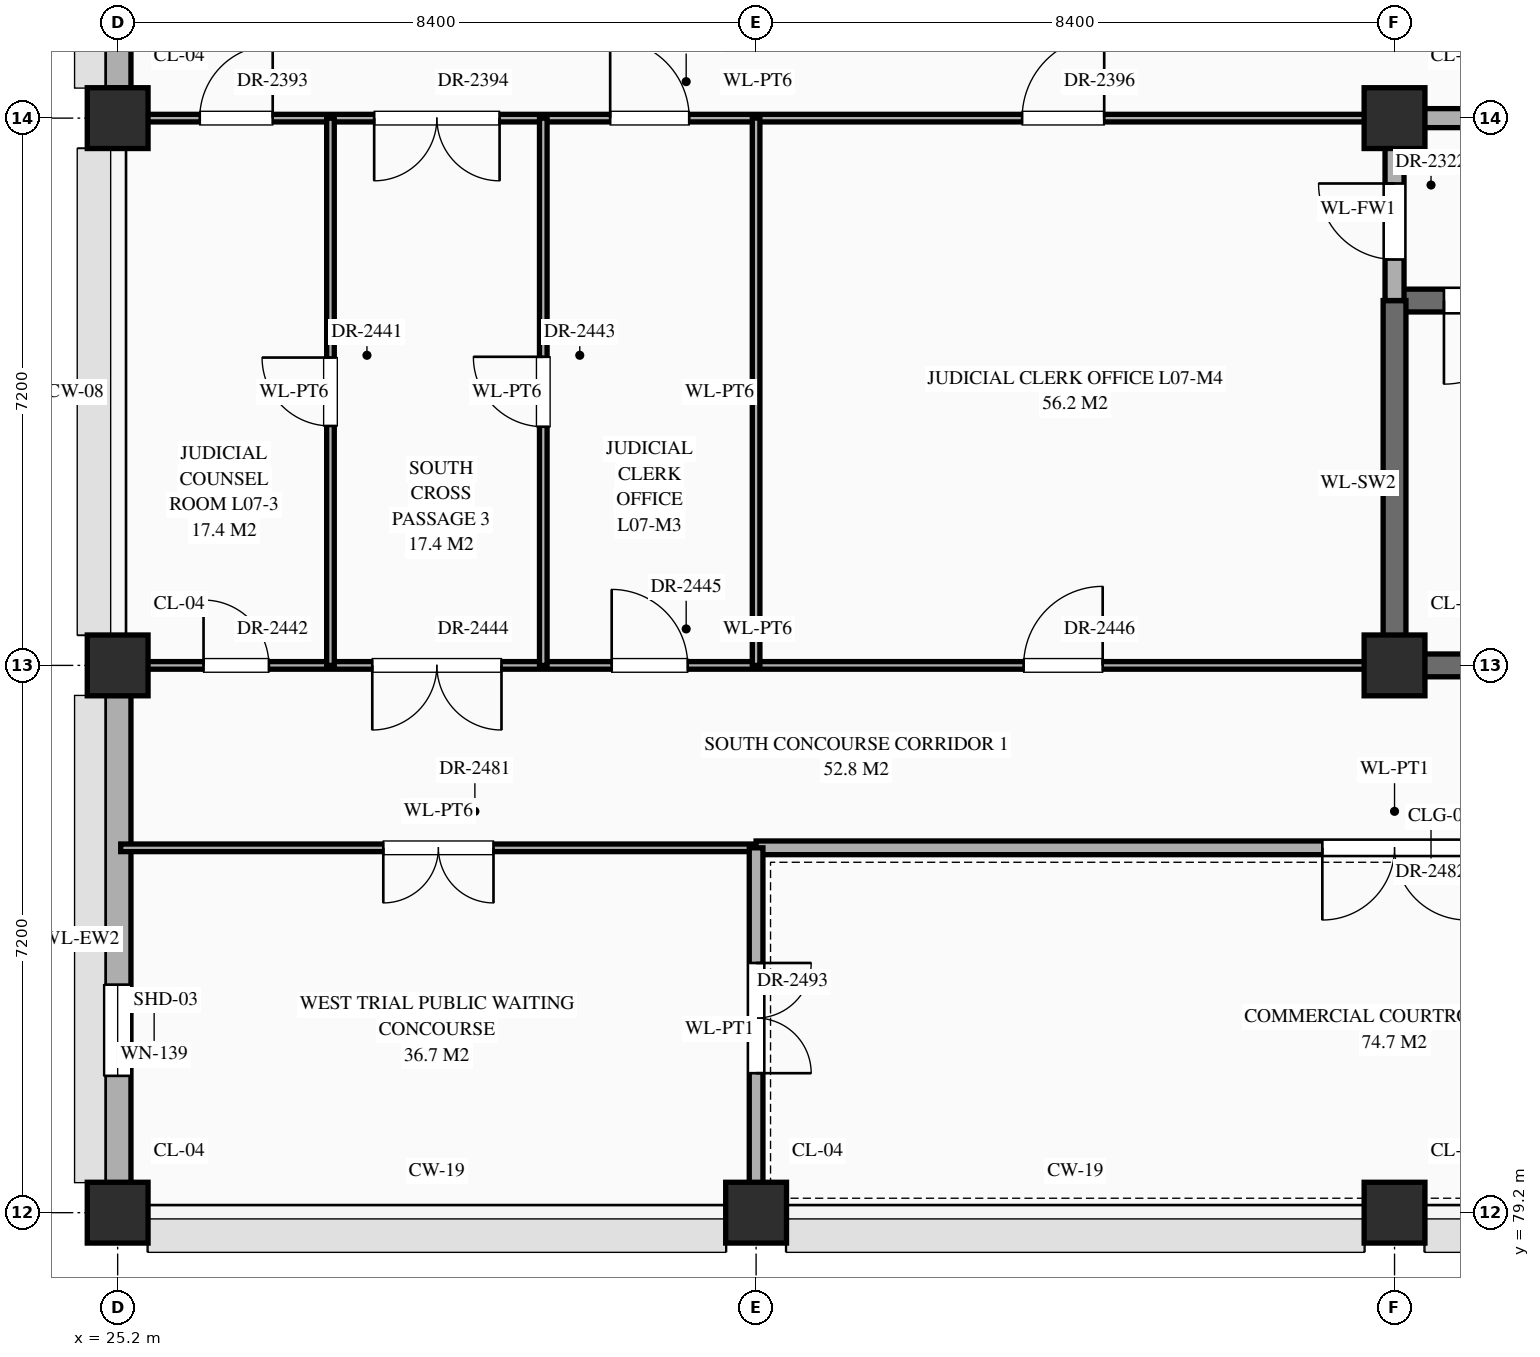
"""IFC4 building model, lengths in metres.
Left out: names, types, materials, properties, quantities, classifications, styles, units other than length and angle.
Written with IfcOpenShell. Run it as: python <this file> out.ifc"""

import sys

from ifc_helpers import new_model, si_unit, direction, frame, frame_2d, origin, origin_2d, place, context, subcontext, project, spatial, rectangle, extrude, element, fill, save


model = new_model("IFC4")
c1 = context("Model", 3, precision=1e-05, world=origin(), true_north=direction((0.0, 1.0)))
c2 = subcontext(c1, "Body", "Model", "MODEL_VIEW")
j1 = project(units=[si_unit("LENGTHUNIT", "METRE"), si_unit("PLANEANGLEUNIT", "RADIAN")], contexts=[c1])
p1 = place(None, origin())
s1 = spatial("IfcSite", under=j1, at=p1, CompositionType="ELEMENT")
p2 = place(p1, origin())
s2 = spatial("IfcBuilding", under=s1, at=p2, CompositionType="ELEMENT")
p3 = place(p2, frame((0.0, 0.0, 30.6)))
s3 = spatial("IfcBuildingStorey", under=s2, at=p3, CompositionType="ELEMENT", Elevation=30.6)
for number, where, z_axis, x_axis in (
    (1, (25.2, 79.2, 0.0), (0.0, 0.0, 1.0), (1.0, 0.0, 0.0)),
    (2, (25.2, 86.4, 0.0), (0.0, 0.0, 1.0), (1.0, 0.0, 0.0)),
    (3, (25.2, 93.6, 0.0), (0.0, 0.0, 1.0), (1.0, 0.0, 0.0)),
    (4, (33.6, 79.2, 0.0), (0.0, 0.0, 1.0), (1.0, 0.0, 0.0)),
    (5, (42.0, 79.2, 0.0), (0.0, 0.0, 1.0), (1.0, 0.0, 0.0)),
    (6, (42.0, 86.4, 0.0), (0.0, 0.0, 1.0), (1.0, 0.0, 0.0)),
    (7, (42.0, 93.6, 0.0), (0.0, 0.0, 1.0), (1.0, 0.0, 0.0)),
):
    element("IfcColumn", number, at=place(p3, frame(where, z_axis=z_axis, x_axis=x_axis)), inside=s3, PredefinedType="COLUMN", context=c2, shape_type="SweptSolid", body=[
        extrude(rectangle(XDim=0.8, YDim=0.8, at=origin_2d()), origin(), (0.0, 0.0, 1.0), 4.5),
    ])
p4 = place(p3, frame((25.2, 79.595, 0.0), z_axis=(0.0, 0.0, 1.0), x_axis=(0.0, 1.0, 0.0)))
e8 = element("IfcWall", 8, at=p4, inside=s3, PredefinedType="STANDARD", context=c2, shape_type="SweptSolid", body=[
    extrude(rectangle(XDim=6.41, YDim=0.35, at=frame_2d((3.205, 0.0))), origin(), (0.0, 0.0, 1.0), 3.65),
])
p5 = place(p4, frame((1.405, 0.0, 0.85)))
e9 = element("IfcOpeningElement", 9, at=p5, cuts=e8, PredefinedType="OPENING", context=c2, shape_type="SweptSolid", body=[
    extrude(rectangle(XDim=1.2, YDim=2.12, at=frame_2d((0.6, 1.06))), frame((0.0, 0.187, 0.0), z_axis=(0.0, -1.0, 0.0), x_axis=(1.0, 0.0, 0.0)), (0.0, 0.0, 1.0), 0.374),
])
p6 = place(p3, frame((25.2, 93.995, 0.0), z_axis=(0.0, 0.0, 1.0), x_axis=(0.0, 1.0, 0.0)))
e10 = element("IfcWall", 10, at=p6, inside=s3, PredefinedType="STANDARD", context=c2, shape_type="SweptSolid", body=[
    extrude(rectangle(XDim=6.41, YDim=0.35, at=frame_2d((3.205, 0.0))), origin(), (0.0, 0.0, 1.0), 3.65),
])
p7 = place(p6, frame((3.73, 0.0, 0.85)))
e11 = element("IfcOpeningElement", 11, at=p7, cuts=e10, PredefinedType="OPENING", context=c2, shape_type="SweptSolid", body=[
    extrude(rectangle(XDim=1.55, YDim=1.38, at=frame_2d((0.775, 0.69))), frame((0.0, 0.187, 0.0), z_axis=(0.0, -1.0, 0.0), x_axis=(1.0, 0.0, 0.0)), (0.0, 0.0, 1.0), 0.374),
])
p8 = place(p3, frame((25.24, 84.0, 0.0), z_axis=(0.0, 0.0, 1.0), x_axis=(1.0, 0.0, 0.0)))
e12 = element("IfcWall", 12, at=p8, inside=s3, PredefinedType="STANDARD", context=c2, shape_type="SweptSolid", body=[
    extrude(rectangle(XDim=8.36, YDim=0.1, at=frame_2d((4.18, 0.0))), origin(), (0.0, 0.0, 1.0), 4.3),
])
p9 = place(p8, frame((3.455, 0.0, 0.0)))
e13 = element("IfcOpeningElement", 13, at=p9, cuts=e12, PredefinedType="OPENING", context=c2, shape_type="SweptSolid", body=[
    extrude(rectangle(XDim=1.45, YDim=2.3, at=frame_2d((0.725, 1.15))), frame((0.0, 0.062, 0.0), z_axis=(0.0, -1.0, 0.0), x_axis=(1.0, 0.0, 0.0)), (0.0, 0.0, 1.0), 0.124),
])
p10 = place(p3, frame((33.6, 84.0, 0.0), z_axis=(0.0, 0.0, 1.0), x_axis=(1.0, 0.0, 0.0)))
e14 = element("IfcWall", 14, at=p10, inside=s3, PredefinedType="STANDARD", context=c2, shape_type="SweptSolid", body=[
    extrude(rectangle(XDim=16.8, YDim=0.18, at=frame_2d((8.4, 0.0))), origin(), (0.0, 0.0, 1.0), 4.15),
])
p11 = place(p10, frame((7.45, 0.0, 0.0)))
e15 = element("IfcOpeningElement", 15, at=p11, cuts=e14, PredefinedType="OPENING", context=c2, shape_type="SweptSolid", body=[
    extrude(rectangle(XDim=1.9, YDim=2.5, at=frame_2d((0.95, 1.25))), frame((0.0, 0.102, 0.0), z_axis=(0.0, -1.0, 0.0), x_axis=(1.0, 0.0, 0.0)), (0.0, 0.0, 1.0), 0.204),
])
p12 = place(p3, frame((25.24, 86.4, 0.0), z_axis=(0.0, 0.0, 1.0), x_axis=(1.0, 0.0, 0.0)))
e16 = element("IfcWall", 16, at=p12, inside=s3, PredefinedType="STANDARD", context=c2, shape_type="SweptSolid", body=[
    extrude(rectangle(XDim=16.76, YDim=0.1, at=frame_2d((8.38, 0.0))), origin(), (0.0, 0.0, 1.0), 3.1),
])
p13 = place(p12, frame((1.09, 0.0, 0.0)))
e17 = element("IfcOpeningElement", 17, at=p13, cuts=e16, PredefinedType="OPENING", context=c2, shape_type="SweptSolid", body=[
    extrude(rectangle(XDim=0.86, YDim=2.1, at=frame_2d((0.43, 1.05))), frame((0.0, 0.062, 0.0), z_axis=(0.0, -1.0, 0.0), x_axis=(1.0, 0.0, 0.0)), (0.0, 0.0, 1.0), 0.124),
])
p14 = place(p12, frame((3.31, 0.0, 0.0)))
e18 = element("IfcOpeningElement", 18, at=p14, cuts=e16, PredefinedType="OPENING", context=c2, shape_type="SweptSolid", body=[
    extrude(rectangle(XDim=1.7, YDim=2.45, at=frame_2d((0.85, 1.225))), frame((0.0, 0.062, 0.0), z_axis=(0.0, -1.0, 0.0), x_axis=(1.0, 0.0, 0.0)), (0.0, 0.0, 1.0), 0.124),
])
p15 = place(p12, frame((6.46, 0.0, 0.0)))
e19 = element("IfcOpeningElement", 19, at=p15, cuts=e16, PredefinedType="OPENING", context=c2, shape_type="SweptSolid", body=[
    extrude(rectangle(XDim=1.0, YDim=2.25, at=frame_2d((0.5, 1.125))), frame((0.0, 0.062, 0.0), z_axis=(0.0, -1.0, 0.0), x_axis=(1.0, 0.0, 0.0)), (0.0, 0.0, 1.0), 0.124),
])
p16 = place(p12, frame((11.88, 0.0, 0.0)))
e20 = element("IfcOpeningElement", 20, at=p16, cuts=e16, PredefinedType="OPENING", context=c2, shape_type="SweptSolid", body=[
    extrude(rectangle(XDim=1.04, YDim=2.2, at=frame_2d((0.52, 1.1))), frame((0.0, 0.062, 0.0), z_axis=(0.0, -1.0, 0.0), x_axis=(1.0, 0.0, 0.0)), (0.0, 0.0, 1.0), 0.124),
])
p17 = place(p3, frame((42.0, 86.4, 0.0), z_axis=(0.0, 0.0, 1.0), x_axis=(1.0, 0.0, 0.0)))
e21 = element("IfcWall", 21, at=p17, inside=s3, PredefinedType="SHEAR", context=c2, shape_type="SweptSolid", body=[
    extrude(rectangle(XDim=8.4, YDim=0.3, at=frame_2d((4.2, 0.0))), origin(), (0.0, 0.0, 1.0), 4.24),
])
p18 = place(p3, frame((42.0, 91.2, 0.0), z_axis=(0.0, 0.0, 1.0), x_axis=(1.0, 0.0, 0.0)))
e22 = element("IfcWall", 22, at=p18, inside=s3, PredefinedType="SHEAR", context=c2, shape_type="SweptSolid", body=[
    extrude(rectangle(XDim=8.4, YDim=0.3, at=frame_2d((4.2, 0.0))), origin(), (0.0, 0.0, 1.0), 4.24),
])
p19 = place(p18, frame((0.65, 0.0, 0.0)))
e23 = element("IfcOpeningElement", 23, at=p19, cuts=e22, PredefinedType="OPENING", context=c2, shape_type="SweptSolid", body=[
    extrude(rectangle(XDim=1.1, YDim=2.2, at=frame_2d((0.55, 1.1))), frame((0.0, 0.162, 0.0), z_axis=(0.0, -1.0, 0.0), x_axis=(1.0, 0.0, 0.0)), (0.0, 0.0, 1.0), 0.324),
])
p20 = place(p3, frame((25.24, 93.6, 0.0), z_axis=(0.0, 0.0, 1.0), x_axis=(1.0, 0.0, 0.0)))
e24 = element("IfcWall", 24, at=p20, inside=s3, PredefinedType="STANDARD", context=c2, shape_type="SweptSolid", body=[
    extrude(rectangle(XDim=16.76, YDim=0.1, at=frame_2d((8.38, 0.0))), origin(), (0.0, 0.0, 1.0), 3.1),
])
p21 = place(p20, frame((1.04, 0.0, 0.0)))
e25 = element("IfcOpeningElement", 25, at=p21, cuts=e24, PredefinedType="OPENING", context=c2, shape_type="SweptSolid", body=[
    extrude(rectangle(XDim=0.96, YDim=2.2, at=frame_2d((0.48, 1.1))), frame((0.0, 0.062, 0.0), z_axis=(0.0, -1.0, 0.0), x_axis=(1.0, 0.0, 0.0)), (0.0, 0.0, 1.0), 0.124),
])
p22 = place(p20, frame((3.335, 0.0, 0.0)))
e26 = element("IfcOpeningElement", 26, at=p22, cuts=e24, PredefinedType="OPENING", context=c2, shape_type="SweptSolid", body=[
    extrude(rectangle(XDim=1.65, YDim=2.4, at=frame_2d((0.825, 1.2))), frame((0.0, 0.062, 0.0), z_axis=(0.0, -1.0, 0.0), x_axis=(1.0, 0.0, 0.0)), (0.0, 0.0, 1.0), 0.124),
])
p23 = place(p20, frame((6.44, 0.0, 0.0)))
e27 = element("IfcOpeningElement", 27, at=p23, cuts=e24, PredefinedType="OPENING", context=c2, shape_type="SweptSolid", body=[
    extrude(rectangle(XDim=1.04, YDim=2.2, at=frame_2d((0.52, 1.1))), frame((0.0, 0.062, 0.0), z_axis=(0.0, -1.0, 0.0), x_axis=(1.0, 0.0, 0.0)), (0.0, 0.0, 1.0), 0.124),
])
p24 = place(p20, frame((11.86, 0.0, 0.0)))
e28 = element("IfcOpeningElement", 28, at=p24, cuts=e24, PredefinedType="OPENING", context=c2, shape_type="SweptSolid", body=[
    extrude(rectangle(XDim=1.08, YDim=2.25, at=frame_2d((0.54, 1.125))), frame((0.0, 0.062, 0.0), z_axis=(0.0, -1.0, 0.0), x_axis=(1.0, 0.0, 0.0)), (0.0, 0.0, 1.0), 0.124),
])
p25 = place(p3, frame((42.0, 93.6, 0.0), z_axis=(0.0, 0.0, 1.0), x_axis=(1.0, 0.0, 0.0)))
e29 = element("IfcWall", 29, at=p25, inside=s3, PredefinedType="STANDARD", context=c2, shape_type="SweptSolid", body=[
    extrude(rectangle(XDim=8.4, YDim=0.25, at=frame_2d((4.2, 0.0))), origin(), (0.0, 0.0, 1.0), 3.39),
])
p26 = place(p25, frame((3.4, 0.0, 0.0)))
e30 = element("IfcOpeningElement", 30, at=p26, cuts=e29, PredefinedType="OPENING", context=c2, shape_type="SweptSolid", body=[
    extrude(rectangle(XDim=1.6, YDim=2.3, at=frame_2d((0.8, 1.15))), frame((0.0, 0.137, 0.0), z_axis=(0.0, -1.0, 0.0), x_axis=(1.0, 0.0, 0.0)), (0.0, 0.0, 1.0), 0.274),
])
p27 = place(p3, frame((28.0, 86.4, 0.0), z_axis=(0.0, 0.0, 1.0), x_axis=(0.0, 1.0, 0.0)))
e31 = element("IfcWall", 31, at=p27, inside=s3, PredefinedType="STANDARD", context=c2, shape_type="SweptSolid", body=[
    extrude(rectangle(XDim=7.2, YDim=0.1, at=frame_2d((3.6, 0.0))), origin(), (0.0, 0.0, 1.0), 4.3),
])
p28 = place(p27, frame((3.15, 0.0, 0.0)))
e32 = element("IfcOpeningElement", 32, at=p28, cuts=e31, PredefinedType="OPENING", context=c2, shape_type="SweptSolid", body=[
    extrude(rectangle(XDim=0.9, YDim=2.15, at=frame_2d((0.45, 1.075))), frame((0.0, 0.062, 0.0), z_axis=(0.0, -1.0, 0.0), x_axis=(1.0, 0.0, 0.0)), (0.0, 0.0, 1.0), 0.124),
])
p29 = place(p3, frame((30.8, 86.4, 0.0), z_axis=(0.0, 0.0, 1.0), x_axis=(0.0, 1.0, 0.0)))
e33 = element("IfcWall", 33, at=p29, inside=s3, PredefinedType="STANDARD", context=c2, shape_type="SweptSolid", body=[
    extrude(rectangle(XDim=7.2, YDim=0.1, at=frame_2d((3.6, 0.0))), origin(), (0.0, 0.0, 1.0), 4.3),
])
p30 = place(p29, frame((3.14, 0.0, 0.0)))
e34 = element("IfcOpeningElement", 34, at=p30, cuts=e33, PredefinedType="OPENING", context=c2, shape_type="SweptSolid", body=[
    extrude(rectangle(XDim=0.92, YDim=2.15, at=frame_2d((0.46, 1.075))), frame((0.0, 0.062, 0.0), z_axis=(0.0, -1.0, 0.0), x_axis=(1.0, 0.0, 0.0)), (0.0, 0.0, 1.0), 0.124),
])
p31 = place(p3, frame((33.6, 79.24, 0.0), z_axis=(0.0, 0.0, 1.0), x_axis=(0.0, 1.0, 0.0)))
e35 = element("IfcWall", 35, at=p31, inside=s3, PredefinedType="STANDARD", context=c2, shape_type="SweptSolid", body=[
    extrude(rectangle(XDim=4.76, YDim=0.18, at=frame_2d((2.38, 0.0))), origin(), (0.0, 0.0, 1.0), 4.3),
])
p32 = place(p31, frame((1.795, 0.0, 0.0)))
e36 = element("IfcOpeningElement", 36, at=p32, cuts=e35, PredefinedType="OPENING", context=c2, shape_type="SweptSolid", body=[
    extrude(rectangle(XDim=1.45, YDim=2.3, at=frame_2d((0.725, 1.15))), frame((0.0, 0.102, 0.0), z_axis=(0.0, -1.0, 0.0), x_axis=(1.0, 0.0, 0.0)), (0.0, 0.0, 1.0), 0.204),
])
p33 = place(p3, frame((33.6, 86.4, 0.0), z_axis=(0.0, 0.0, 1.0), x_axis=(0.0, 1.0, 0.0)))
e37 = element("IfcWall", 37, at=p33, inside=s3, PredefinedType="STANDARD", context=c2, shape_type="SweptSolid", body=[
    extrude(rectangle(XDim=7.2, YDim=0.1, at=frame_2d((3.6, 0.0))), origin(), (0.0, 0.0, 1.0), 4.3),
])
p34 = place(p3, frame((42.0, 86.4, 0.0), z_axis=(0.0, 0.0, 1.0), x_axis=(0.0, 1.0, 0.0)))
e38 = element("IfcWall", 38, at=p34, inside=s3, PredefinedType="SHEAR", context=c2, shape_type="SweptSolid", body=[
    extrude(rectangle(XDim=4.8, YDim=0.3, at=frame_2d((2.4, 0.0))), origin(), (0.0, 0.0, 1.0), 4.15),
])
p35 = place(p3, frame((42.0, 91.2, 0.0), z_axis=(0.0, 0.0, 1.0), x_axis=(0.0, 1.0, 0.0)))
e39 = element("IfcWall", 39, at=p35, inside=s3, PredefinedType="STANDARD", context=c2, shape_type="SweptSolid", body=[
    extrude(rectangle(XDim=2.4, YDim=0.25, at=frame_2d((1.2, 0.0))), origin(), (0.0, 0.0, 1.0), 3.4),
])
p36 = place(p35, frame((0.54, 0.0, 0.0)))
e40 = element("IfcOpeningElement", 40, at=p36, cuts=e39, PredefinedType="OPENING", context=c2, shape_type="SweptSolid", body=[
    extrude(rectangle(XDim=1.0, YDim=2.2, at=frame_2d((0.5, 1.1))), frame((0.0, 0.137, 0.0), z_axis=(0.0, -1.0, 0.0), x_axis=(1.0, 0.0, 0.0)), (0.0, 0.0, 1.0), 0.274),
])
p37 = place(p5, origin())
e41 = element("IfcWindow", 41, at=p37, inside=s3, PartitioningType="SINGLE_PANEL", PredefinedType="WINDOW", context=c2, shape_type="SweptSolid", body=[
    extrude(rectangle(XDim=1.2, YDim=2.12, at=frame_2d((0.6, 1.06))), frame((0.0, 0.03, 0.0), z_axis=(0.0, -1.0, 0.0), x_axis=(1.0, 0.0, 0.0)), (0.0, 0.0, 1.0), 0.06),
])
fill(e9, e41)
p38 = place(p19, frame((1.1, 0.0, 0.0), z_axis=(0.0, 0.0, 1.0), x_axis=(-1.0, 0.0, 0.0)))
e42 = element("IfcDoor", 42, at=p38, inside=s3, OperationType="SINGLE_SWING_RIGHT", PredefinedType="DOOR", context=c2, shape_type="SweptSolid", body=[
    extrude(rectangle(XDim=1.1, YDim=2.2, at=frame_2d((0.55, 1.1))), frame((0.0, 0.025, 0.0), z_axis=(0.0, -1.0, 0.0), x_axis=(1.0, 0.0, 0.0)), (0.0, 0.0, 1.0), 0.05),
])
fill(e23, e42)
p39 = place(p36, origin())
e43 = element("IfcDoor", 43, at=p39, inside=s3, OperationType="SINGLE_SWING_RIGHT", PredefinedType="DOOR", context=c2, shape_type="SweptSolid", body=[
    extrude(rectangle(XDim=1.0, YDim=2.2, at=frame_2d((0.5, 1.1))), frame((0.0, 0.025, 0.0), z_axis=(0.0, -1.0, 0.0), x_axis=(1.0, 0.0, 0.0)), (0.0, 0.0, 1.0), 0.05),
])
fill(e40, e43)
p40 = place(p21, origin())
e44 = element("IfcDoor", 44, at=p40, inside=s3, OperationType="SINGLE_SWING_RIGHT", PredefinedType="DOOR", context=c2, shape_type="SweptSolid", body=[
    extrude(rectangle(XDim=0.96, YDim=2.2, at=frame_2d((0.48, 1.1))), frame((0.0, 0.025, 0.0), z_axis=(0.0, -1.0, 0.0), x_axis=(1.0, 0.0, 0.0)), (0.0, 0.0, 1.0), 0.05),
])
fill(e25, e44)
p41 = place(p22, frame((1.65, 0.0, 0.0), z_axis=(0.0, 0.0, 1.0), x_axis=(-1.0, 0.0, 0.0)))
e45 = element("IfcDoor", 45, at=p41, inside=s3, OperationType="DOUBLE_DOOR_SINGLE_SWING", PredefinedType="DOOR", context=c2, shape_type="SweptSolid", body=[
    extrude(rectangle(XDim=1.65, YDim=2.4, at=frame_2d((0.825, 1.2))), frame((0.0, 0.025, 0.0), z_axis=(0.0, -1.0, 0.0), x_axis=(1.0, 0.0, 0.0)), (0.0, 0.0, 1.0), 0.05),
])
fill(e26, e45)
p42 = place(p23, origin())
e46 = element("IfcDoor", 46, at=p42, inside=s3, OperationType="SINGLE_SWING_LEFT", PredefinedType="DOOR", context=c2, shape_type="SweptSolid", body=[
    extrude(rectangle(XDim=1.04, YDim=2.2, at=frame_2d((0.52, 1.1))), frame((0.0, 0.025, 0.0), z_axis=(0.0, -1.0, 0.0), x_axis=(1.0, 0.0, 0.0)), (0.0, 0.0, 1.0), 0.05),
])
fill(e27, e46)
p43 = place(p24, origin())
e47 = element("IfcDoor", 47, at=p43, inside=s3, OperationType="SINGLE_SWING_RIGHT", PredefinedType="DOOR", context=c2, shape_type="SweptSolid", body=[
    extrude(rectangle(XDim=1.08, YDim=2.25, at=frame_2d((0.54, 1.125))), frame((0.0, 0.025, 0.0), z_axis=(0.0, -1.0, 0.0), x_axis=(1.0, 0.0, 0.0)), (0.0, 0.0, 1.0), 0.05),
])
fill(e28, e47)
p44 = place(p28, origin())
e48 = element("IfcDoor", 48, at=p44, inside=s3, OperationType="SINGLE_SWING_RIGHT", PredefinedType="DOOR", context=c2, shape_type="SweptSolid", body=[
    extrude(rectangle(XDim=0.9, YDim=2.15, at=frame_2d((0.45, 1.075))), frame((0.0, 0.025, 0.0), z_axis=(0.0, -1.0, 0.0), x_axis=(1.0, 0.0, 0.0)), (0.0, 0.0, 1.0), 0.05),
])
fill(e32, e48)
p45 = place(p13, origin())
e49 = element("IfcDoor", 49, at=p45, inside=s3, OperationType="SINGLE_SWING_LEFT", PredefinedType="DOOR", context=c2, shape_type="SweptSolid", body=[
    extrude(rectangle(XDim=0.86, YDim=2.1, at=frame_2d((0.43, 1.05))), frame((0.0, 0.025, 0.0), z_axis=(0.0, -1.0, 0.0), x_axis=(1.0, 0.0, 0.0)), (0.0, 0.0, 1.0), 0.05),
])
fill(e17, e49)
p46 = place(p30, origin())
e50 = element("IfcDoor", 50, at=p46, inside=s3, OperationType="SINGLE_SWING_RIGHT", PredefinedType="DOOR", context=c2, shape_type="SweptSolid", body=[
    extrude(rectangle(XDim=0.92, YDim=2.15, at=frame_2d((0.46, 1.075))), frame((0.0, 0.025, 0.0), z_axis=(0.0, -1.0, 0.0), x_axis=(1.0, 0.0, 0.0)), (0.0, 0.0, 1.0), 0.05),
])
fill(e34, e50)
p47 = place(p14, frame((1.7, 0.0, 0.0), z_axis=(0.0, 0.0, 1.0), x_axis=(-1.0, 0.0, 0.0)))
e51 = element("IfcDoor", 51, at=p47, inside=s3, OperationType="DOUBLE_DOOR_SINGLE_SWING", PredefinedType="DOOR", context=c2, shape_type="SweptSolid", body=[
    extrude(rectangle(XDim=1.7, YDim=2.45, at=frame_2d((0.85, 1.225))), frame((0.0, 0.025, 0.0), z_axis=(0.0, -1.0, 0.0), x_axis=(1.0, 0.0, 0.0)), (0.0, 0.0, 1.0), 0.05),
])
fill(e18, e51)
p48 = place(p15, origin())
e52 = element("IfcDoor", 52, at=p48, inside=s3, OperationType="SINGLE_SWING_LEFT", PredefinedType="DOOR", context=c2, shape_type="SweptSolid", body=[
    extrude(rectangle(XDim=1.0, YDim=2.25, at=frame_2d((0.5, 1.125))), frame((0.0, 0.025, 0.0), z_axis=(0.0, -1.0, 0.0), x_axis=(1.0, 0.0, 0.0)), (0.0, 0.0, 1.0), 0.05),
])
fill(e19, e52)
p49 = place(p16, origin())
e53 = element("IfcDoor", 53, at=p49, inside=s3, OperationType="SINGLE_SWING_RIGHT", PredefinedType="DOOR", context=c2, shape_type="SweptSolid", body=[
    extrude(rectangle(XDim=1.04, YDim=2.2, at=frame_2d((0.52, 1.1))), frame((0.0, 0.025, 0.0), z_axis=(0.0, -1.0, 0.0), x_axis=(1.0, 0.0, 0.0)), (0.0, 0.0, 1.0), 0.05),
])
fill(e20, e53)
p50 = place(p9, frame((1.45, 0.0, 0.0), z_axis=(0.0, 0.0, 1.0), x_axis=(-1.0, 0.0, 0.0)))
e54 = element("IfcDoor", 54, at=p50, inside=s3, OperationType="DOUBLE_DOOR_SINGLE_SWING", PredefinedType="DOOR", context=c2, shape_type="SweptSolid", body=[
    extrude(rectangle(XDim=1.45, YDim=2.3, at=frame_2d((0.725, 1.15))), frame((0.0, 0.025, 0.0), z_axis=(0.0, -1.0, 0.0), x_axis=(1.0, 0.0, 0.0)), (0.0, 0.0, 1.0), 0.05),
])
fill(e13, e54)
p51 = place(p11, frame((1.9, 0.0, 0.0), z_axis=(0.0, 0.0, 1.0), x_axis=(-1.0, 0.0, 0.0)))
e55 = element("IfcDoor", 55, at=p51, inside=s3, OperationType="DOUBLE_DOOR_SINGLE_SWING", PredefinedType="DOOR", context=c2, shape_type="SweptSolid", body=[
    extrude(rectangle(XDim=1.9, YDim=2.5, at=frame_2d((0.95, 1.25))), frame((0.0, 0.025, 0.0), z_axis=(0.0, -1.0, 0.0), x_axis=(1.0, 0.0, 0.0)), (0.0, 0.0, 1.0), 0.05),
])
fill(e15, e55)
p52 = place(p32, frame((1.45, 0.0, 0.0), z_axis=(0.0, 0.0, 1.0), x_axis=(-1.0, 0.0, 0.0)))
e56 = element("IfcDoor", 56, at=p52, inside=s3, OperationType="DOUBLE_DOOR_SINGLE_SWING", PredefinedType="DOOR", context=c2, shape_type="SweptSolid", body=[
    extrude(rectangle(XDim=1.45, YDim=2.3, at=frame_2d((0.725, 1.15))), frame((0.0, 0.025, 0.0), z_axis=(0.0, -1.0, 0.0), x_axis=(1.0, 0.0, 0.0)), (0.0, 0.0, 1.0), 0.05),
])
fill(e36, e56)
save(model, sys.argv[1])
